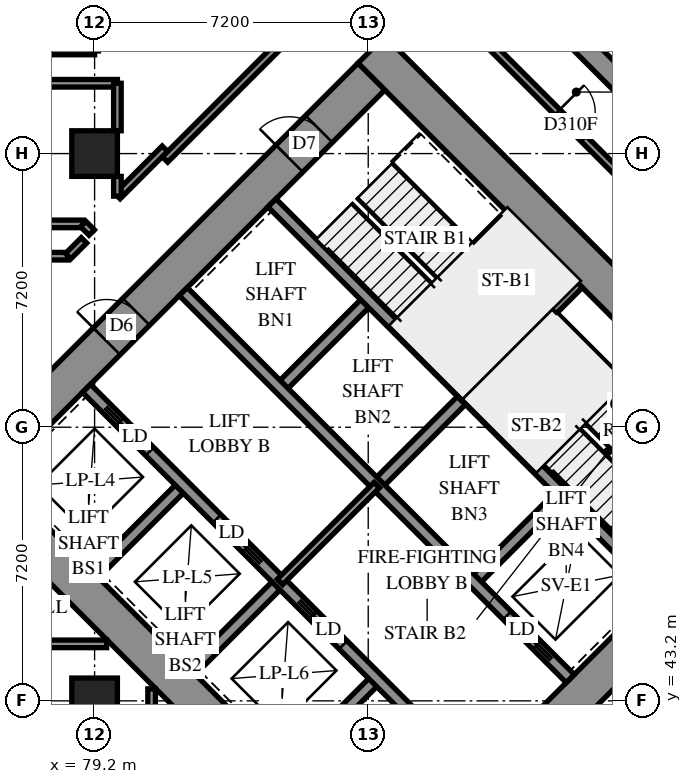
"""IFC4 building model, lengths in metres.
Left out: names, types, materials, properties, quantities, classifications, styles, units other than length and angle.
Written with IfcOpenShell. Run it as: python <this file> out.ifc"""

import sys

from ifc_helpers import new_model, si_unit, direction, frame, frame_2d, origin, origin_2d, place, context, subcontext, project, spatial, polyline, rectangle, outline, extrude, element, fill, save


model = new_model("IFC4")
c1 = context("Model", 3, precision=1e-05, world=origin(), true_north=direction((0.0, 1.0)))
c2 = subcontext(c1, "Body", "Model", "MODEL_VIEW")
j1 = project(units=[si_unit("LENGTHUNIT", "METRE"), si_unit("PLANEANGLEUNIT", "RADIAN")], contexts=[c1])
p1 = place(None, origin())
s1 = spatial("IfcSite", under=j1, at=p1, CompositionType="ELEMENT")
p2 = place(p1, origin())
s2 = spatial("IfcBuilding", under=s1, at=p2, CompositionType="ELEMENT")
p3 = place(p2, frame((0.0, 0.0, 14.4)))
s3 = spatial("IfcBuildingStorey", under=s2, at=p3, CompositionType="ELEMENT", Elevation=14.4)
for number, where, z_axis, x_axis in (
    (1, (79.2, 43.2, 0.0), (0.0, 0.0, 1.0), (1.0, 0.0, 0.0)),
    (2, (79.2, 57.6, 0.0), (0.0, 0.0, 1.0), (1.0, 0.0, 0.0)),
):
    element("IfcColumn", number, at=place(p3, frame(where, z_axis=z_axis, x_axis=x_axis)), inside=s3, PredefinedType="COLUMN", context=c2, shape_type="SweptSolid", body=[
        extrude(rectangle(XDim=1.2, YDim=1.2, at=origin_2d()), origin(), (0.0, 0.0, 1.0), 3.8),
    ])
p4 = place(p3, frame((75.594, 49.443, -0.4), z_axis=(0.0, 0.0, 1.0), x_axis=(0.7071037324, -0.70710983, 0.0)))
e3 = element("IfcWall", 3, at=p4, inside=s3, PredefinedType="SHEAR", context=c2, shape_type="SweptSolid", body=[
    extrude(rectangle(XDim=16.4, YDim=1.0, at=frame_2d((8.2, 0.0))), origin(), (0.0, 0.0, 1.0), 3.5),
])
p5 = place(p3, frame((86.483, 60.333, -0.4), z_axis=(0.0, 0.0, 1.0), x_axis=(0.70710983, -0.7071037324, 0.0)))
e4 = element("IfcWall", 4, at=p5, inside=s3, PredefinedType="SHEAR", context=c2, shape_type="SweptSolid", body=[
    extrude(rectangle(XDim=16.4, YDim=1.0, at=frame_2d((8.2, 0.0))), origin(), (0.0, 0.0, 1.0), 3.5),
])
p6 = place(p5, frame((11.0, 0.0, 0.4)))
e5 = element("IfcOpeningElement", 5, at=p6, cuts=e4, PredefinedType="OPENING", context=c2, shape_type="SweptSolid", body=[
    extrude(rectangle(XDim=0.8, YDim=2.1, at=frame_2d((0.4, 1.05))), frame((0.0, 0.51, 0.0), z_axis=(0.0, -1.0, 0.0), x_axis=(1.0, 0.0, 0.0)), (0.0, 0.0, 1.0), 1.02),
])
p7 = place(p3, frame((76.301, 49.443, -0.4), z_axis=(0.0, 0.0, 1.0), x_axis=(0.7071067812, 0.7071067812, 0.0)))
e6 = element("IfcWall", 6, at=p7, inside=s3, PredefinedType="SHEAR", context=c2, shape_type="SweptSolid", body=[
    extrude(rectangle(XDim=14.4, YDim=1.0, at=frame_2d((7.2, 0.0))), origin(), (0.0, 0.0, 1.0), 3.5),
])
p8 = place(p7, frame((4.55, 0.0, 0.4)))
e7 = element("IfcOpeningElement", 7, at=p8, cuts=e6, PredefinedType="OPENING", context=c2, shape_type="SweptSolid", body=[
    extrude(rectangle(XDim=1.1, YDim=2.1, at=frame_2d((0.55, 1.05))), frame((0.0, 0.51, 0.0), z_axis=(0.0, -1.0, 0.0), x_axis=(1.0, 0.0, 0.0)), (0.0, 0.0, 1.0), 1.02),
])
p9 = place(p7, frame((11.35, 0.0, 0.4)))
e8 = element("IfcOpeningElement", 8, at=p9, cuts=e6, PredefinedType="OPENING", context=c2, shape_type="SweptSolid", body=[
    extrude(rectangle(XDim=1.1, YDim=2.1, at=frame_2d((0.55, 1.05))), frame((0.0, 0.51, 0.0), z_axis=(0.0, -1.0, 0.0), x_axis=(1.0, 0.0, 0.0)), (0.0, 0.0, 1.0), 1.02),
])
p10 = place(p3, frame((87.19, 38.554, -0.4), z_axis=(0.0, 0.0, 1.0), x_axis=(0.707103309, 0.7071102534, 0.0)))
e9 = element("IfcWall", 9, at=p10, inside=s3, PredefinedType="SHEAR", context=c2, shape_type="SweptSolid", body=[
    extrude(rectangle(XDim=14.4, YDim=1.0, at=frame_2d((7.2, 0.0))), origin(), (0.0, 0.0, 1.0), 3.5),
])
p11 = place(p10, frame((4.55, 0.0, 0.4)))
e10 = element("IfcOpeningElement", 10, at=p11, cuts=e9, PredefinedType="OPENING", context=c2, shape_type="SweptSolid", body=[
    extrude(rectangle(XDim=1.1, YDim=2.1, at=frame_2d((0.55, 1.05))), frame((0.0, 0.51, 0.0), z_axis=(0.0, -1.0, 0.0), x_axis=(1.0, 0.0, 0.0)), (0.0, 0.0, 1.0), 1.02),
])
p12 = place(p10, frame((11.35, 0.0, 0.4)))
e11 = element("IfcOpeningElement", 11, at=p12, cuts=e9, PredefinedType="OPENING", context=c2, shape_type="SweptSolid", body=[
    extrude(rectangle(XDim=1.1, YDim=2.1, at=frame_2d((0.55, 1.05))), frame((0.0, 0.51, 0.0), z_axis=(0.0, -1.0, 0.0), x_axis=(1.0, 0.0, 0.0)), (0.0, 0.0, 1.0), 1.02),
])
for number, where, z_axis, x_axis in (
    (12, (79.2, 46.544, 0.0), (0.0, 0.0, 1.0), (0.707, 0.707, 0.0)),
    (13, (84.079, 51.423, 0.0), (0.0, 0.0, 1.0), (0.707, 0.707, 0.0)),
):
    element("IfcWall", number, at=place(p3, frame(where, z_axis=z_axis, x_axis=x_axis)), inside=s3, PredefinedType="SOLIDWALL", context=c2, shape_type="SweptSolid", body=[
        extrude(rectangle(XDim=3.3, YDim=0.3, at=frame_2d((1.65, 0.0))), origin(), (0.0, 0.0, 1.0), 3.8),
    ])
p13 = place(p3, frame((81.746, 43.999, 0.0), z_axis=(0.0, 0.0, 1.0), x_axis=(0.7071067812, 0.7071067812, 0.0)))
e14 = element("IfcWall", 14, at=p13, inside=s3, PredefinedType="SOLIDWALL", context=c2, shape_type="SweptSolid", body=[
    extrude(rectangle(XDim=3.3, YDim=0.3, at=frame_2d((1.65, 0.0))), origin(), (0.0, 0.0, 1.0), 3.8),
])
p14 = place(p3, frame((86.625, 48.878, 0.0), z_axis=(0.0, 0.0, 1.0), x_axis=(0.7071067812, 0.7071067812, 0.0)))
e15 = element("IfcWall", 15, at=p14, inside=s3, PredefinedType="SOLIDWALL", context=c2, shape_type="SweptSolid", body=[
    extrude(rectangle(XDim=3.3, YDim=0.3, at=frame_2d((1.65, 0.0))), origin(), (0.0, 0.0, 1.0), 3.8),
])
p15 = place(p3, frame((84.291, 41.453, 0.0), z_axis=(0.0, 0.0, 1.0), x_axis=(0.7071067812, 0.7071067812, 0.0)))
e16 = element("IfcWall", 16, at=p15, inside=s3, PredefinedType="SOLIDWALL", context=c2, shape_type="SweptSolid", body=[
    extrude(rectangle(XDim=3.3, YDim=0.3, at=frame_2d((1.65, 0.0))), origin(), (0.0, 0.0, 1.0), 3.8),
])
p16 = place(p3, frame((89.17, 46.332, 0.0), z_axis=(0.0, 0.0, 1.0), x_axis=(0.7071067812, 0.7071067812, 0.0)))
e17 = element("IfcWall", 17, at=p16, inside=s3, PredefinedType="SOLIDWALL", context=c2, shape_type="SweptSolid", body=[
    extrude(rectangle(XDim=3.3, YDim=0.3, at=frame_2d((1.65, 0.0))), origin(), (0.0, 0.0, 1.0), 3.8),
])
p17 = place(p3, frame((78.988, 51.423, 0.0), z_axis=(0.0, 0.0, 1.0), x_axis=(0.7071067812, -0.7071067812, 0.0)))
e18 = element("IfcWall", 18, at=p17, inside=s3, PredefinedType="SOLIDWALL", context=c2, shape_type="SweptSolid", body=[
    extrude(rectangle(XDim=14.4, YDim=0.3, at=frame_2d((7.2, 0.0))), origin(), (0.0, 0.0, 1.0), 3.8),
])
p18 = place(p17, frame((1.25, 0.0, 0.0)))
e19 = element("IfcOpeningElement", 19, at=p18, cuts=e18, PredefinedType="OPENING", context=c2, shape_type="SweptSolid", body=[
    extrude(rectangle(XDim=1.1, YDim=2.1, at=frame_2d((0.55, 1.05))), frame((0.0, 0.16, 0.0), z_axis=(0.0, -1.0, 0.0), x_axis=(1.0, 0.0, 0.0)), (0.0, 0.0, 1.0), 0.32),
])
p19 = place(p17, frame((4.85, 0.0, 0.0)))
e20 = element("IfcOpeningElement", 20, at=p19, cuts=e18, PredefinedType="OPENING", context=c2, shape_type="SweptSolid", body=[
    extrude(rectangle(XDim=1.1, YDim=2.1, at=frame_2d((0.55, 1.05))), frame((0.0, 0.16, 0.0), z_axis=(0.0, -1.0, 0.0), x_axis=(1.0, 0.0, 0.0)), (0.0, 0.0, 1.0), 0.32),
])
p20 = place(p17, frame((8.45, 0.0, 0.0)))
e21 = element("IfcOpeningElement", 21, at=p20, cuts=e18, PredefinedType="OPENING", context=c2, shape_type="SweptSolid", body=[
    extrude(rectangle(XDim=1.1, YDim=2.1, at=frame_2d((0.55, 1.05))), frame((0.0, 0.16, 0.0), z_axis=(0.0, -1.0, 0.0), x_axis=(1.0, 0.0, 0.0)), (0.0, 0.0, 1.0), 0.32),
])
p21 = place(p17, frame((12.05, 0.0, 0.0)))
e22 = element("IfcOpeningElement", 22, at=p21, cuts=e18, PredefinedType="OPENING", context=c2, shape_type="SweptSolid", body=[
    extrude(rectangle(XDim=1.1, YDim=2.1, at=frame_2d((0.55, 1.05))), frame((0.0, 0.16, 0.0), z_axis=(0.0, -1.0, 0.0), x_axis=(1.0, 0.0, 0.0)), (0.0, 0.0, 1.0), 0.32),
])
p22 = place(p3, frame((81.534, 53.969, 0.0), z_axis=(0.0, 0.0, 1.0), x_axis=(0.707103309, -0.7071102534, 0.0)))
e23 = element("IfcWall", 23, at=p22, inside=s3, PredefinedType="SOLIDWALL", context=c2, shape_type="SweptSolid", body=[
    extrude(rectangle(XDim=14.4, YDim=0.3, at=frame_2d((7.2, 0.0))), origin(), (0.0, 0.0, 1.0), 3.8),
])
p23 = place(p22, frame((12.05, 0.0, 0.0)))
e24 = element("IfcOpeningElement", 24, at=p23, cuts=e23, PredefinedType="OPENING", context=c2, shape_type="SweptSolid", body=[
    extrude(rectangle(XDim=1.1, YDim=2.1, at=frame_2d((0.55, 1.05))), frame((0.0, 0.16, 0.0), z_axis=(0.0, -1.0, 0.0), x_axis=(1.0, 0.0, 0.0)), (0.0, 0.0, 1.0), 0.32),
])
for number, where, z_axis, x_axis in (
    (25, (83.867, 56.302, 0.0), (0.0, 0.0, 1.0), (0.707, -0.707, 0.0)),
    (26, (88.958, 51.211, 0.0), (0.0, 0.0, 1.0), (0.707, -0.707, 0.0)),
):
    element("IfcWall", number, at=place(p3, frame(where, z_axis=z_axis, x_axis=x_axis)), inside=s3, PredefinedType="SOLIDWALL", context=c2, shape_type="SweptSolid", body=[
        extrude(rectangle(XDim=7.2, YDim=0.3, at=frame_2d((3.6, 0.0))), origin(), (0.0, 0.0, 1.0), 3.8),
    ])
p24 = place(p3, frame((88.958, 51.211, 0.0), z_axis=(0.0, 0.0, 1.0), x_axis=(0.7071067812, 0.7071067812, 0.0)))
e27 = element("IfcWall", 27, at=p24, inside=s3, PredefinedType="SOLIDWALL", context=c2, shape_type="SweptSolid", body=[
    extrude(rectangle(XDim=4.2, YDim=0.3, at=frame_2d((2.1, 0.0))), origin(), (0.0, 0.0, 1.0), 3.8),
])
p25 = place(p3, frame((117.843, 34.665, 0.0), z_axis=(0.0, 0.0, 1.0), x_axis=(-0.7071067812, 0.7071067812, 0.0)))
e28 = element("IfcWall", 28, at=p25, inside=s3, PredefinedType="SOLIDWALL", context=c2, shape_type="SweptSolid", body=[
    extrude(outline(polyline([(-0.275, -0.275), (54.222, -0.275), (53.994, 0.275), (0.275, 0.275), (-0.275, -0.275)])), origin(), (0.0, 0.0, 1.0), 3.8),
])
p26 = place(p25, frame((0.8, 0.0, 0.7)))
e29 = element("IfcOpeningElement", 29, at=p26, cuts=e28, PredefinedType="OPENING", context=c2, shape_type="SweptSolid", body=[
    extrude(rectangle(XDim=1.8, YDim=2.6, at=frame_2d((0.9, 1.3))), frame((0.0, 0.285, 0.0), z_axis=(0.0, -1.0, 0.0), x_axis=(1.0, 0.0, 0.0)), (0.0, 0.0, 1.0), 0.57),
])
p27 = place(p25, frame((4.225, 0.0, 0.7)))
e30 = element("IfcOpeningElement", 30, at=p27, cuts=e28, PredefinedType="OPENING", context=c2, shape_type="SweptSolid", body=[
    extrude(rectangle(XDim=1.8, YDim=2.6, at=frame_2d((0.9, 1.3))), frame((0.0, 0.285, 0.0), z_axis=(0.0, -1.0, 0.0), x_axis=(1.0, 0.0, 0.0)), (0.0, 0.0, 1.0), 0.57),
])
p28 = place(p25, frame((7.825, 0.0, 0.7)))
e31 = element("IfcOpeningElement", 31, at=p28, cuts=e28, PredefinedType="OPENING", context=c2, shape_type="SweptSolid", body=[
    extrude(rectangle(XDim=1.8, YDim=2.6, at=frame_2d((0.9, 1.3))), frame((0.0, 0.285, 0.0), z_axis=(0.0, -1.0, 0.0), x_axis=(1.0, 0.0, 0.0)), (0.0, 0.0, 1.0), 0.57),
])
p29 = place(p25, frame((11.425, 0.0, 0.7)))
e32 = element("IfcOpeningElement", 32, at=p29, cuts=e28, PredefinedType="OPENING", context=c2, shape_type="SweptSolid", body=[
    extrude(rectangle(XDim=1.8, YDim=2.6, at=frame_2d((0.9, 1.3))), frame((0.0, 0.285, 0.0), z_axis=(0.0, -1.0, 0.0), x_axis=(1.0, 0.0, 0.0)), (0.0, 0.0, 1.0), 0.57),
])
p30 = place(p25, frame((15.025, 0.0, 0.7)))
e33 = element("IfcOpeningElement", 33, at=p30, cuts=e28, PredefinedType="OPENING", context=c2, shape_type="SweptSolid", body=[
    extrude(rectangle(XDim=1.8, YDim=2.6, at=frame_2d((0.9, 1.3))), frame((0.0, 0.285, 0.0), z_axis=(0.0, -1.0, 0.0), x_axis=(1.0, 0.0, 0.0)), (0.0, 0.0, 1.0), 0.57),
])
p31 = place(p25, frame((18.625, 0.0, 0.7)))
e34 = element("IfcOpeningElement", 34, at=p31, cuts=e28, PredefinedType="OPENING", context=c2, shape_type="SweptSolid", body=[
    extrude(rectangle(XDim=1.8, YDim=2.6, at=frame_2d((0.9, 1.3))), frame((0.0, 0.285, 0.0), z_axis=(0.0, -1.0, 0.0), x_axis=(1.0, 0.0, 0.0)), (0.0, 0.0, 1.0), 0.57),
])
p32 = place(p25, frame((22.225, 0.0, 0.7)))
e35 = element("IfcOpeningElement", 35, at=p32, cuts=e28, PredefinedType="OPENING", context=c2, shape_type="SweptSolid", body=[
    extrude(rectangle(XDim=1.8, YDim=2.6, at=frame_2d((0.9, 1.3))), frame((0.0, 0.285, 0.0), z_axis=(0.0, -1.0, 0.0), x_axis=(1.0, 0.0, 0.0)), (0.0, 0.0, 1.0), 0.57),
])
p33 = place(p25, frame((25.825, 0.0, 0.7)))
e36 = element("IfcOpeningElement", 36, at=p33, cuts=e28, PredefinedType="OPENING", context=c2, shape_type="SweptSolid", body=[
    extrude(rectangle(XDim=1.8, YDim=2.6, at=frame_2d((0.9, 1.3))), frame((0.0, 0.285, 0.0), z_axis=(0.0, -1.0, 0.0), x_axis=(1.0, 0.0, 0.0)), (0.0, 0.0, 1.0), 0.57),
])
p34 = place(p25, frame((29.425, 0.0, 0.7)))
e37 = element("IfcOpeningElement", 37, at=p34, cuts=e28, PredefinedType="OPENING", context=c2, shape_type="SweptSolid", body=[
    extrude(rectangle(XDim=1.8, YDim=2.6, at=frame_2d((0.9, 1.3))), frame((0.0, 0.285, 0.0), z_axis=(0.0, -1.0, 0.0), x_axis=(1.0, 0.0, 0.0)), (0.0, 0.0, 1.0), 0.57),
])
p35 = place(p25, frame((33.025, 0.0, 0.7)))
e38 = element("IfcOpeningElement", 38, at=p35, cuts=e28, PredefinedType="OPENING", context=c2, shape_type="SweptSolid", body=[
    extrude(rectangle(XDim=1.8, YDim=2.6, at=frame_2d((0.9, 1.3))), frame((0.0, 0.285, 0.0), z_axis=(0.0, -1.0, 0.0), x_axis=(1.0, 0.0, 0.0)), (0.0, 0.0, 1.0), 0.57),
])
p36 = place(p25, frame((36.625, 0.0, 0.7)))
e39 = element("IfcOpeningElement", 39, at=p36, cuts=e28, PredefinedType="OPENING", context=c2, shape_type="SweptSolid", body=[
    extrude(rectangle(XDim=1.8, YDim=2.6, at=frame_2d((0.9, 1.3))), frame((0.0, 0.285, 0.0), z_axis=(0.0, -1.0, 0.0), x_axis=(1.0, 0.0, 0.0)), (0.0, 0.0, 1.0), 0.57),
])
p37 = place(p25, frame((40.225, 0.0, 0.7)))
e40 = element("IfcOpeningElement", 40, at=p37, cuts=e28, PredefinedType="OPENING", context=c2, shape_type="SweptSolid", body=[
    extrude(rectangle(XDim=1.8, YDim=2.6, at=frame_2d((0.9, 1.3))), frame((0.0, 0.285, 0.0), z_axis=(0.0, -1.0, 0.0), x_axis=(1.0, 0.0, 0.0)), (0.0, 0.0, 1.0), 0.57),
])
p38 = place(p25, frame((43.825, 0.0, 0.7)))
e41 = element("IfcOpeningElement", 41, at=p38, cuts=e28, PredefinedType="OPENING", context=c2, shape_type="SweptSolid", body=[
    extrude(rectangle(XDim=1.8, YDim=2.6, at=frame_2d((0.9, 1.3))), frame((0.0, 0.285, 0.0), z_axis=(0.0, -1.0, 0.0), x_axis=(1.0, 0.0, 0.0)), (0.0, 0.0, 1.0), 0.57),
])
p39 = place(p25, frame((47.425, 0.0, 0.7)))
e42 = element("IfcOpeningElement", 42, at=p39, cuts=e28, PredefinedType="OPENING", context=c2, shape_type="SweptSolid", body=[
    extrude(rectangle(XDim=1.8, YDim=2.6, at=frame_2d((0.9, 1.3))), frame((0.0, 0.285, 0.0), z_axis=(0.0, -1.0, 0.0), x_axis=(1.0, 0.0, 0.0)), (0.0, 0.0, 1.0), 0.57),
])
p40 = place(p25, frame((51.06, 0.0, 0.7)))
e43 = element("IfcOpeningElement", 43, at=p40, cuts=e28, PredefinedType="OPENING", context=c2, shape_type="SweptSolid", body=[
    extrude(rectangle(XDim=1.8, YDim=2.6, at=frame_2d((0.9, 1.3))), frame((0.0, 0.285, 0.0), z_axis=(0.0, -1.0, 0.0), x_axis=(1.0, 0.0, 0.0)), (0.0, 0.0, 1.0), 0.57),
])
p41 = place(p3, frame((91.313, 53.354, 0.0), z_axis=(0.0, 0.0, 1.0), x_axis=(0.7071067812, -0.7071067812, 0.0)))
e44 = element("IfcWall", 44, at=p41, inside=s3, PredefinedType="PARTITIONING", context=c2, shape_type="SweptSolid", body=[
    extrude(rectangle(XDim=5.65, YDim=0.15, at=frame_2d((2.825, 0.0))), origin(), (0.0, 0.0, 1.0), 3.8),
])
p42 = place(p3, frame((84.079, 46.332, 0.0), z_axis=(0.0, 0.0, 1.0), x_axis=(0.7071067812, 0.7071067812, 0.0)))
e45 = element("IfcWall", 45, at=p42, inside=s3, PredefinedType="PARTITIONING", context=c2, shape_type="SweptSolid", body=[
    extrude(rectangle(XDim=3.6, YDim=0.2, at=frame_2d((1.8, 0.0))), origin(), (0.0, 0.0, 1.0), 3.8),
])
p43 = place(p3, frame((81.053, 57.445, 0.0), z_axis=(0.0, 0.0, 1.0), x_axis=(0.7069845395, 0.7072290017, 0.0)))
e46 = element("IfcWall", 46, at=p43, inside=s3, PredefinedType="PARTITIONING", context=c2, shape_type="SweptSolid", body=[
    extrude(rectangle(XDim=8.181, YDim=0.2, at=frame_2d((4.091, 0.0))), origin(), (0.0, 0.0, 1.0), 3.8),
])
p44 = place(p3, frame((88.847, 61.215, 0.0), z_axis=(0.0, 0.0, 1.0), x_axis=(0.7071067812, -0.7071067812, 0.0)))
e47 = element("IfcWall", 47, at=p44, inside=s3, PredefinedType="PARTITIONING", context=c2, shape_type="SweptSolid", body=[
    extrude(rectangle(XDim=7.105, YDim=0.2, at=frame_2d((3.553, 0.0))), origin(), (0.0, 0.0, 1.0), 3.8),
])
p45 = place(p44, frame((3.571, 0.0, 0.0)))
e48 = element("IfcOpeningElement", 48, at=p45, cuts=e47, PredefinedType="OPENING", context=c2, shape_type="SweptSolid", body=[
    extrude(rectangle(XDim=1.0, YDim=2.1, at=frame_2d((0.5, 1.05))), frame((0.0, 0.11, 0.0), z_axis=(0.0, -1.0, 0.0), x_axis=(1.0, 0.0, 0.0)), (0.0, 0.0, 1.0), 0.22),
])
p46 = place(p3, frame((74.802, 54.9, 0.0), z_axis=(0.0, 0.0, 1.0), x_axis=(1.0, 0.0, 0.0)))
e49 = element("IfcWall", 49, at=p46, inside=s3, PredefinedType="PARTITIONING", context=c2, shape_type="SweptSolid", body=[
    extrude(rectangle(XDim=3.702, YDim=0.2, at=frame_2d((1.851, 0.0))), origin(), (0.0, 0.0, 1.0), 3.8),
])
p47 = place(p46, frame((0.873, 0.0, 0.0)))
e50 = element("IfcOpeningElement", 50, at=p47, cuts=e49, PredefinedType="OPENING", context=c2, shape_type="SweptSolid", body=[
    extrude(rectangle(XDim=1.0, YDim=2.1, at=frame_2d((0.5, 1.05))), frame((0.0, 0.11, 0.0), z_axis=(0.0, -1.0, 0.0), x_axis=(1.0, 0.0, 0.0)), (0.0, 0.0, 1.0), 0.22),
])
p48 = place(p3, frame((76.902, 60.3, 0.0), z_axis=(0.0, 0.0, 1.0), x_axis=(1.0, 0.0, 0.0)))
e51 = element("IfcWall", 51, at=p48, inside=s3, PredefinedType="PARTITIONING", context=c2, shape_type="SweptSolid", body=[
    extrude(rectangle(XDim=2.298, YDim=0.2, at=frame_2d((1.149, 0.0))), origin(), (0.0, 0.0, 1.0), 3.8),
])
p49 = place(p3, frame((77.75, 59.45, 0.0), z_axis=(0.0, 0.0, 1.0), x_axis=(1.0, 0.0, 0.0)))
e52 = element("IfcWall", 52, at=p49, inside=s3, PredefinedType="PARTITIONING", context=c2, shape_type="SweptSolid", body=[
    extrude(rectangle(XDim=2.05, YDim=0.2, at=frame_2d((1.025, 0.0))), origin(), (0.0, 0.0, 1.0), 3.8),
])
for number, where, z_axis, x_axis in (
    (53, (77.702, 44.7, 0.0), (0.0, 0.0, 1.0), (1.0, 0.0, 0.0)),
    (54, (80.7, 41.702, 0.0), (0.0, 0.0, 1.0), (0.0, 1.0, 0.0)),
):
    element("IfcWall", number, at=place(p3, frame(where, z_axis=z_axis, x_axis=x_axis)), inside=s3, PredefinedType="PARTITIONING", context=c2, shape_type="SweptSolid", body=[
        extrude(rectangle(XDim=1.814, YDim=0.2, at=frame_2d((0.907, 0.0))), origin(), (0.0, 0.0, 1.0), 3.8),
    ])
p50 = place(p3, frame((79.801, 56.481, 0.0), z_axis=(0.0, 0.0, 1.0), x_axis=(0.7071067812, 0.7071067812, 0.0)))
e55 = element("IfcWall", 55, at=p50, inside=s3, PredefinedType="PARTITIONING", context=c2, shape_type="SweptSolid", body=[
    extrude(rectangle(XDim=1.765, YDim=0.2, at=frame_2d((0.882, 0.0))), origin(), (0.0, 0.0, 1.0), 3.8),
])
p51 = place(p3, frame((77.352, 55.75, 0.0), z_axis=(0.0, 0.0, 1.0), x_axis=(1.0, 0.0, 0.0)))
e56 = element("IfcWall", 56, at=p51, inside=s3, PredefinedType="PARTITIONING", context=c2, shape_type="SweptSolid", body=[
    extrude(rectangle(XDim=1.552, YDim=0.2, at=frame_2d((0.776, 0.0))), origin(), (0.0, 0.0, 1.0), 3.8),
])
p52 = place(p3, frame((79.8, 58.2, 0.0), z_axis=(0.0, 0.0, 1.0), x_axis=(0.0, 1.0, 0.0)))
e57 = element("IfcWall", 57, at=p52, inside=s3, PredefinedType="PARTITIONING", context=c2, shape_type="SweptSolid", body=[
    extrude(rectangle(XDim=1.25, YDim=0.2, at=frame_2d((0.625, 0.0))), origin(), (0.0, 0.0, 1.0), 3.8),
])
p53 = place(p3, frame((78.505, 54.901, 0.0), z_axis=(0.0, 0.0, 1.0), x_axis=(0.7071067812, 0.7071067812, 0.0)))
e58 = element("IfcWall", 58, at=p53, inside=s3, PredefinedType="PARTITIONING", context=c2, shape_type="SweptSolid", body=[
    extrude(rectangle(XDim=0.588, YDim=0.2, at=frame_2d((0.294, 0.0))), origin(), (0.0, 0.0, 1.0), 3.8),
])
p54 = place(p3, frame((79.8, 56.48, 0.0), z_axis=(0.0, 0.0, 1.0), x_axis=(0.0, 1.0, 0.0)))
e59 = element("IfcWall", 59, at=p54, inside=s3, PredefinedType="PARTITIONING", context=c2, shape_type="SweptSolid", body=[
    extrude(rectangle(XDim=0.52, YDim=0.2, at=frame_2d((0.26, 0.0))), origin(), (0.0, 0.0, 1.0), 3.8),
])
p55 = place(p3, frame((78.901, 55.747, 0.0), z_axis=(0.0, 0.0, 1.0), x_axis=(0.7071067812, -0.7071067812, 0.0)))
e60 = element("IfcWall", 60, at=p55, inside=s3, PredefinedType="PARTITIONING", context=c2, shape_type="SweptSolid", body=[
    extrude(rectangle(XDim=0.317, YDim=0.2, at=frame_2d((0.158, 0.0))), origin(), (0.0, 0.0, 1.0), 3.8),
])
p56 = place(p8, origin())
e61 = element("IfcDoor", 61, at=p56, inside=s3, OperationType="DOUBLE_DOOR_SINGLE_SWING", PredefinedType="DOOR", context=c2, shape_type="SweptSolid", body=[
    extrude(rectangle(XDim=1.1, YDim=2.1, at=frame_2d((0.55, 1.05))), frame((0.0, 0.025, 0.0), z_axis=(0.0, -1.0, 0.0), x_axis=(1.0, 0.0, 0.0)), (0.0, 0.0, 1.0), 0.05),
])
fill(e7, e61)
p57 = place(p9, origin())
e62 = element("IfcDoor", 62, at=p57, inside=s3, OperationType="SINGLE_SWING_LEFT", PredefinedType="DOOR", context=c2, shape_type="SweptSolid", body=[
    extrude(rectangle(XDim=1.1, YDim=2.1, at=frame_2d((0.55, 1.05))), frame((0.0, 0.025, 0.0), z_axis=(0.0, -1.0, 0.0), x_axis=(1.0, 0.0, 0.0)), (0.0, 0.0, 1.0), 0.05),
])
fill(e8, e62)
p58 = place(p18, origin())
e63 = element("IfcDoor", 63, at=p58, inside=s3, OperationType="SLIDING_TO_LEFT", PredefinedType="DOOR", context=c2, shape_type="SweptSolid", body=[
    extrude(rectangle(XDim=1.1, YDim=2.1, at=frame_2d((0.55, 1.05))), frame((0.0, 0.025, 0.0), z_axis=(0.0, -1.0, 0.0), x_axis=(1.0, 0.0, 0.0)), (0.0, 0.0, 1.0), 0.05),
])
fill(e19, e63)
p59 = place(p19, origin())
e64 = element("IfcDoor", 64, at=p59, inside=s3, OperationType="SLIDING_TO_RIGHT", PredefinedType="DOOR", context=c2, shape_type="SweptSolid", body=[
    extrude(rectangle(XDim=1.1, YDim=2.1, at=frame_2d((0.55, 1.05))), frame((0.0, 0.025, 0.0), z_axis=(0.0, -1.0, 0.0), x_axis=(1.0, 0.0, 0.0)), (0.0, 0.0, 1.0), 0.05),
])
fill(e20, e64)
p60 = place(p20, origin())
e65 = element("IfcDoor", 65, at=p60, inside=s3, OperationType="SLIDING_TO_LEFT", PredefinedType="DOOR", context=c2, shape_type="SweptSolid", body=[
    extrude(rectangle(XDim=1.1, YDim=2.1, at=frame_2d((0.55, 1.05))), frame((0.0, 0.025, 0.0), z_axis=(0.0, -1.0, 0.0), x_axis=(1.0, 0.0, 0.0)), (0.0, 0.0, 1.0), 0.05),
])
fill(e21, e65)
p61 = place(p23, origin())
e66 = element("IfcDoor", 66, at=p61, inside=s3, OperationType="SLIDING_TO_RIGHT", PredefinedType="DOOR", context=c2, shape_type="SweptSolid", body=[
    extrude(rectangle(XDim=1.1, YDim=2.1, at=frame_2d((0.55, 1.05))), frame((0.0, 0.025, 0.0), z_axis=(0.0, -1.0, 0.0), x_axis=(1.0, 0.0, 0.0)), (0.0, 0.0, 1.0), 0.05),
])
fill(e24, e66)
p62 = place(p45, origin())
e67 = element("IfcDoor", 67, at=p62, inside=s3, OperationType="SINGLE_SWING_LEFT", PredefinedType="DOOR", context=c2, shape_type="SweptSolid", body=[
    extrude(rectangle(XDim=1.0, YDim=2.1, at=frame_2d((0.5, 1.05))), frame((0.0, 0.025, 0.0), z_axis=(0.0, -1.0, 0.0), x_axis=(1.0, 0.0, 0.0)), (0.0, 0.0, 1.0), 0.05),
])
fill(e48, e67)
save(model, sys.argv[1])
